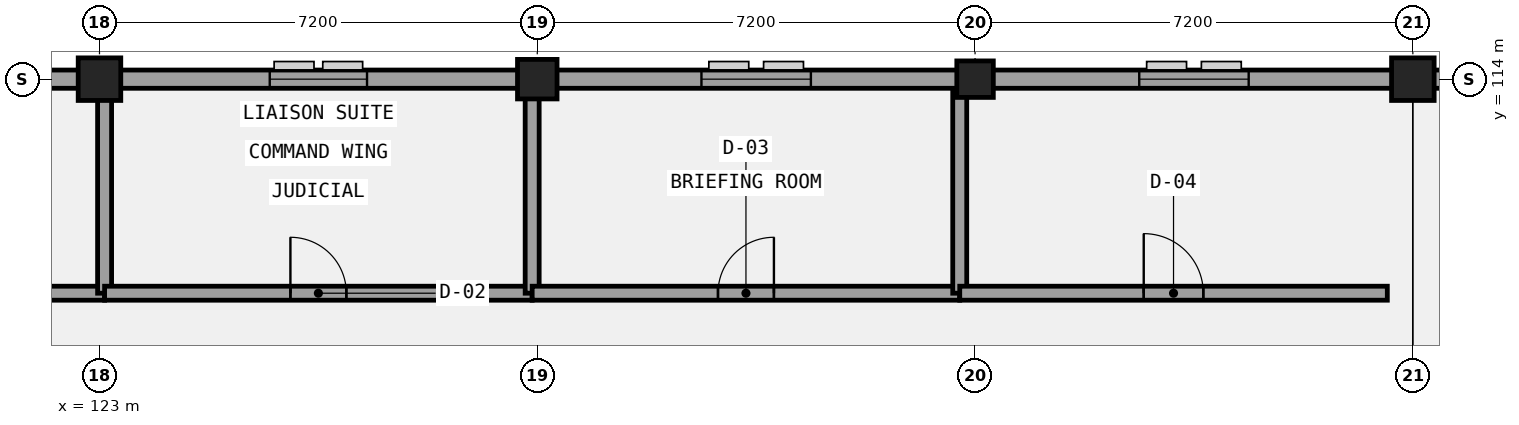
"""IFC4 building model, lengths in metres.
Left out: names, types, materials, properties, quantities, classifications, styles, units other than length and angle.
Written with IfcOpenShell. Run it as: python <this file> out.ifc"""

import sys

from ifc_helpers import new_model, si_unit, direction, frame, frame_2d, origin, origin_2d, place, context, subcontext, project, spatial, rectangle, extrude, element, fill, save


model = new_model("IFC4")
c1 = context("Model", 3, precision=1e-05, world=origin(), true_north=direction((0.0, 1.0)))
c2 = subcontext(c1, "Body", "Model", "MODEL_VIEW")
j1 = project(units=[si_unit("LENGTHUNIT", "METRE"), si_unit("PLANEANGLEUNIT", "RADIAN")], contexts=[c1])
p1 = place(None, origin())
s1 = spatial("IfcSite", under=j1, at=p1, CompositionType="ELEMENT")
p2 = place(p1, origin())
s2 = spatial("IfcBuilding", under=s1, at=p2, CompositionType="ELEMENT")
p3 = place(p2, frame((0.0, 0.0, 13.8)))
s3 = spatial("IfcBuildingStorey", under=s2, at=p3, CompositionType="ELEMENT", Elevation=13.8)
p4 = place(p3, frame((123.0, 114.0, 0.0), z_axis=(0.0, 0.0, 1.0), x_axis=(1.0, 0.0, 0.0)))
e1 = element("IfcColumn", 1, at=p4, inside=s3, PredefinedType="COLUMN", context=c2, shape_type="SweptSolid", body=[
    extrude(rectangle(XDim=0.7, YDim=0.7, at=origin_2d()), origin(), (0.0, 0.0, 1.0), 4.2),
])
p5 = place(p3, frame((130.2, 114.0, 0.0), z_axis=(0.0, 0.0, 1.0), x_axis=(1.0, 0.0, 0.0)))
e2 = element("IfcColumn", 2, at=p5, inside=s3, PredefinedType="COLUMN", context=c2, shape_type="SweptSolid", body=[
    extrude(rectangle(XDim=0.65, YDim=0.65, at=origin_2d()), origin(), (0.0, 0.0, 1.0), 4.2),
])
p6 = place(p3, frame((137.4, 114.0, 0.0), z_axis=(0.0, 0.0, 1.0), x_axis=(1.0, 0.0, 0.0)))
e3 = element("IfcColumn", 3, at=p6, inside=s3, PredefinedType="COLUMN", context=c2, shape_type="SweptSolid", body=[
    extrude(rectangle(XDim=0.6, YDim=0.6, at=origin_2d()), origin(), (0.0, 0.0, 1.0), 4.2),
])
p7 = place(p3, frame((144.6, 114.0, 0.0), z_axis=(0.0, 0.0, 1.0), x_axis=(1.0, 0.0, 0.0)))
e4 = element("IfcColumn", 4, at=p7, inside=s3, PredefinedType="COLUMN", context=c2, shape_type="SweptSolid", body=[
    extrude(rectangle(XDim=0.7, YDim=0.7, at=origin_2d()), origin(), (0.0, 0.0, 1.0), 4.2),
])
p8 = place(p3, frame((166.35, 114.0, 0.0), z_axis=(0.0, 0.0, 1.0), x_axis=(-1.0, 0.0, 0.0)))
e5 = element("IfcWall", 5, at=p8, inside=s3, PredefinedType="SOLIDWALL", context=c2, shape_type="SweptSolid", body=[
    extrude(rectangle(XDim=21.9, YDim=0.3, at=frame_2d((10.95, 0.0))), origin(), (0.0, 0.0, 1.0), 3.19),
])
p9 = place(p8, frame((17.35, 0.0, 0.95)))
e6 = element("IfcOpeningElement", 6, at=p9, cuts=e5, PredefinedType="OPENING", context=c2, shape_type="SweptSolid", body=[
    extrude(rectangle(XDim=1.6, YDim=1.4, at=frame_2d((0.8, 0.7))), frame((0.0, 0.16, 0.0), z_axis=(0.0, -1.0, 0.0), x_axis=(1.0, 0.0, 0.0)), (0.0, 0.0, 1.0), 0.32),
])
p10 = place(p3, frame((144.75, 114.0, 0.0), z_axis=(0.0, 0.0, 1.0), x_axis=(-1.0, 0.0, 0.0)))
e7 = element("IfcWall", 7, at=p10, inside=s3, PredefinedType="SOLIDWALL", context=c2, shape_type="SweptSolid", body=[
    extrude(rectangle(XDim=36.3, YDim=0.3, at=frame_2d((18.15, 0.0))), origin(), (0.0, 0.0, 1.0), 3.19),
])
p11 = place(p10, frame((31.75, 0.0, 0.95)))
e8 = element("IfcOpeningElement", 8, at=p11, cuts=e7, PredefinedType="OPENING", context=c2, shape_type="SweptSolid", body=[
    extrude(rectangle(XDim=1.6, YDim=1.4, at=frame_2d((0.8, 0.7))), frame((0.0, 0.16, 0.0), z_axis=(0.0, -1.0, 0.0), x_axis=(1.0, 0.0, 0.0)), (0.0, 0.0, 1.0), 0.32),
])
p12 = place(p10, frame((24.55, 0.0, 0.95)))
e9 = element("IfcOpeningElement", 9, at=p12, cuts=e7, PredefinedType="OPENING", context=c2, shape_type="SweptSolid", body=[
    extrude(rectangle(XDim=1.6, YDim=1.65, at=frame_2d((0.8, 0.825))), frame((0.0, 0.16, 0.0), z_axis=(0.0, -1.0, 0.0), x_axis=(1.0, 0.0, 0.0)), (0.0, 0.0, 1.0), 0.32),
])
p13 = place(p10, frame((17.35, 0.0, 0.95)))
e10 = element("IfcOpeningElement", 10, at=p13, cuts=e7, PredefinedType="OPENING", context=c2, shape_type="SweptSolid", body=[
    extrude(rectangle(XDim=1.6, YDim=1.9, at=frame_2d((0.8, 0.95))), frame((0.0, 0.16, 0.0), z_axis=(0.0, -1.0, 0.0), x_axis=(1.0, 0.0, 0.0)), (0.0, 0.0, 1.0), 0.32),
])
p14 = place(p10, frame((10.05, 0.0, 0.95)))
e11 = element("IfcOpeningElement", 11, at=p14, cuts=e7, PredefinedType="OPENING", context=c2, shape_type="SweptSolid", body=[
    extrude(rectangle(XDim=1.8, YDim=1.4, at=frame_2d((0.9, 0.7))), frame((0.0, 0.16, 0.0), z_axis=(0.0, -1.0, 0.0), x_axis=(1.0, 0.0, 0.0)), (0.0, 0.0, 1.0), 0.32),
])
p15 = place(p10, frame((2.85, 0.0, 0.95)))
e12 = element("IfcOpeningElement", 12, at=p15, cuts=e7, PredefinedType="OPENING", context=c2, shape_type="SweptSolid", body=[
    extrude(rectangle(XDim=1.8, YDim=1.65, at=frame_2d((0.9, 0.825))), frame((0.0, 0.16, 0.0), z_axis=(0.0, -1.0, 0.0), x_axis=(1.0, 0.0, 0.0)), (0.0, 0.0, 1.0), 0.32),
])
p16 = place(p3, frame((116.052, 110.48, 0.0), z_axis=(0.0, 0.0, 1.0), x_axis=(1.0, 0.0, 0.0)))
e13 = element("IfcWall", 13, at=p16, inside=s3, PredefinedType="PARTITIONING", context=c2, shape_type="SweptSolid", body=[
    extrude(rectangle(XDim=7.032, YDim=0.23, at=frame_2d((3.516, 0.0))), origin(), (0.0, 0.0, 1.0), 3.39),
])
p17 = place(p16, frame((3.056, 0.0, 0.0)))
e14 = element("IfcOpeningElement", 14, at=p17, cuts=e13, PredefinedType="OPENING", context=c2, shape_type="SweptSolid", body=[
    extrude(rectangle(XDim=0.92, YDim=2.1, at=frame_2d((0.46, 1.05))), frame((0.0, 0.125, 0.0), z_axis=(0.0, -1.0, 0.0), x_axis=(1.0, 0.0, 0.0)), (0.0, 0.0, 1.0), 0.25),
])
p18 = place(p3, frame((123.084, 110.48, 0.0), z_axis=(0.0, 0.0, 1.0), x_axis=(0.0, 1.0, 0.0)))
e15 = element("IfcWall", 15, at=p18, inside=s3, PredefinedType="PARTITIONING", context=c2, shape_type="SweptSolid", body=[
    extrude(rectangle(XDim=3.34, YDim=0.23, at=frame_2d((1.67, 0.0))), origin(), (0.0, 0.0, 1.0), 3.24),
])
p19 = place(p3, frame((123.084, 110.48, 0.0), z_axis=(0.0, 0.0, 1.0), x_axis=(1.0, 0.0, 0.0)))
e16 = element("IfcWall", 16, at=p19, inside=s3, PredefinedType="PARTITIONING", context=c2, shape_type="SweptSolid", body=[
    extrude(rectangle(XDim=7.032, YDim=0.23, at=frame_2d((3.516, 0.0))), origin(), (0.0, 0.0, 1.0), 3.39),
])
p20 = place(p19, frame((3.056, 0.0, 0.0)))
e17 = element("IfcOpeningElement", 17, at=p20, cuts=e16, PredefinedType="OPENING", context=c2, shape_type="SweptSolid", body=[
    extrude(rectangle(XDim=0.92, YDim=2.22, at=frame_2d((0.46, 1.11))), frame((0.0, 0.125, 0.0), z_axis=(0.0, -1.0, 0.0), x_axis=(1.0, 0.0, 0.0)), (0.0, 0.0, 1.0), 0.25),
])
p21 = place(p3, frame((130.116, 110.48, 0.0), z_axis=(0.0, 0.0, 1.0), x_axis=(0.0, 1.0, 0.0)))
e18 = element("IfcWall", 18, at=p21, inside=s3, PredefinedType="PARTITIONING", context=c2, shape_type="SweptSolid", body=[
    extrude(rectangle(XDim=3.34, YDim=0.23, at=frame_2d((1.67, 0.0))), origin(), (0.0, 0.0, 1.0), 3.14),
])
p22 = place(p3, frame((130.116, 110.48, 0.0), z_axis=(0.0, 0.0, 1.0), x_axis=(1.0, 0.0, 0.0)))
e19 = element("IfcWall", 19, at=p22, inside=s3, PredefinedType="PARTITIONING", context=c2, shape_type="SweptSolid", body=[
    extrude(rectangle(XDim=7.032, YDim=0.23, at=frame_2d((3.516, 0.0))), origin(), (0.0, 0.0, 1.0), 3.39),
])
p23 = place(p22, frame((3.056, 0.0, 0.0)))
e20 = element("IfcOpeningElement", 20, at=p23, cuts=e19, PredefinedType="OPENING", context=c2, shape_type="SweptSolid", body=[
    extrude(rectangle(XDim=0.92, YDim=2.35, at=frame_2d((0.46, 1.175))), frame((0.0, 0.125, 0.0), z_axis=(0.0, -1.0, 0.0), x_axis=(1.0, 0.0, 0.0)), (0.0, 0.0, 1.0), 0.25),
])
p24 = place(p3, frame((137.148, 110.48, 0.0), z_axis=(0.0, 0.0, 1.0), x_axis=(0.0, 1.0, 0.0)))
e21 = element("IfcWall", 21, at=p24, inside=s3, PredefinedType="PARTITIONING", context=c2, shape_type="SweptSolid", body=[
    extrude(rectangle(XDim=3.34, YDim=0.23, at=frame_2d((1.67, 0.0))), origin(), (0.0, 0.0, 1.0), 3.09),
])
p25 = place(p3, frame((137.148, 110.48, 0.0), z_axis=(0.0, 0.0, 1.0), x_axis=(1.0, 0.0, 0.0)))
e22 = element("IfcWall", 22, at=p25, inside=s3, PredefinedType="PARTITIONING", context=c2, shape_type="SweptSolid", body=[
    extrude(rectangle(XDim=7.032, YDim=0.23, at=frame_2d((3.516, 0.0))), origin(), (0.0, 0.0, 1.0), 3.39),
])
p26 = place(p25, frame((3.026, 0.0, 0.0)))
e23 = element("IfcOpeningElement", 23, at=p26, cuts=e22, PredefinedType="OPENING", context=c2, shape_type="SweptSolid", body=[
    extrude(rectangle(XDim=0.98, YDim=2.1, at=frame_2d((0.49, 1.05))), frame((0.0, 0.125, 0.0), z_axis=(0.0, -1.0, 0.0), x_axis=(1.0, 0.0, 0.0)), (0.0, 0.0, 1.0), 0.25),
])
p27 = place(p13, origin())
e24 = element("IfcWindow", 24, at=p27, inside=s3, PartitioningType="SINGLE_PANEL", PredefinedType="WINDOW", context=c2, shape_type="SweptSolid", body=[
    extrude(rectangle(XDim=1.6, YDim=1.9, at=frame_2d((0.8, 0.95))), frame((0.0, 0.03, 0.0), z_axis=(0.0, -1.0, 0.0), x_axis=(1.0, 0.0, 0.0)), (0.0, 0.0, 1.0), 0.06),
])
fill(e10, e24)
p28 = place(p14, origin())
e25 = element("IfcWindow", 25, at=p28, inside=s3, PartitioningType="SINGLE_PANEL", PredefinedType="WINDOW", context=c2, shape_type="SweptSolid", body=[
    extrude(rectangle(XDim=1.8, YDim=1.4, at=frame_2d((0.9, 0.7))), frame((0.0, 0.03, 0.0), z_axis=(0.0, -1.0, 0.0), x_axis=(1.0, 0.0, 0.0)), (0.0, 0.0, 1.0), 0.06),
])
fill(e11, e25)
p29 = place(p15, origin())
e26 = element("IfcWindow", 26, at=p29, inside=s3, PartitioningType="SINGLE_PANEL", PredefinedType="WINDOW", context=c2, shape_type="SweptSolid", body=[
    extrude(rectangle(XDim=1.8, YDim=1.65, at=frame_2d((0.9, 0.825))), frame((0.0, 0.03, 0.0), z_axis=(0.0, -1.0, 0.0), x_axis=(1.0, 0.0, 0.0)), (0.0, 0.0, 1.0), 0.06),
])
fill(e12, e26)
p30 = place(p20, origin())
e27 = element("IfcDoor", 27, at=p30, inside=s3, OperationType="SINGLE_SWING_LEFT", PredefinedType="DOOR", context=c2, shape_type="SweptSolid", body=[
    extrude(rectangle(XDim=0.92, YDim=2.22, at=frame_2d((0.46, 1.11))), frame((0.0, 0.025, 0.0), z_axis=(0.0, -1.0, 0.0), x_axis=(1.0, 0.0, 0.0)), (0.0, 0.0, 1.0), 0.05),
])
fill(e17, e27)
p31 = place(p23, origin())
e28 = element("IfcDoor", 28, at=p31, inside=s3, OperationType="SINGLE_SWING_RIGHT", PredefinedType="DOOR", context=c2, shape_type="SweptSolid", body=[
    extrude(rectangle(XDim=0.92, YDim=2.35, at=frame_2d((0.46, 1.175))), frame((0.0, 0.025, 0.0), z_axis=(0.0, -1.0, 0.0), x_axis=(1.0, 0.0, 0.0)), (0.0, 0.0, 1.0), 0.05),
])
fill(e20, e28)
p32 = place(p26, origin())
e29 = element("IfcDoor", 29, at=p32, inside=s3, OperationType="SINGLE_SWING_LEFT", PredefinedType="DOOR", context=c2, shape_type="SweptSolid", body=[
    extrude(rectangle(XDim=0.98, YDim=2.1, at=frame_2d((0.49, 1.05))), frame((0.0, 0.025, 0.0), z_axis=(0.0, -1.0, 0.0), x_axis=(1.0, 0.0, 0.0)), (0.0, 0.0, 1.0), 0.05),
])
fill(e23, e29)
save(model, sys.argv[1])
